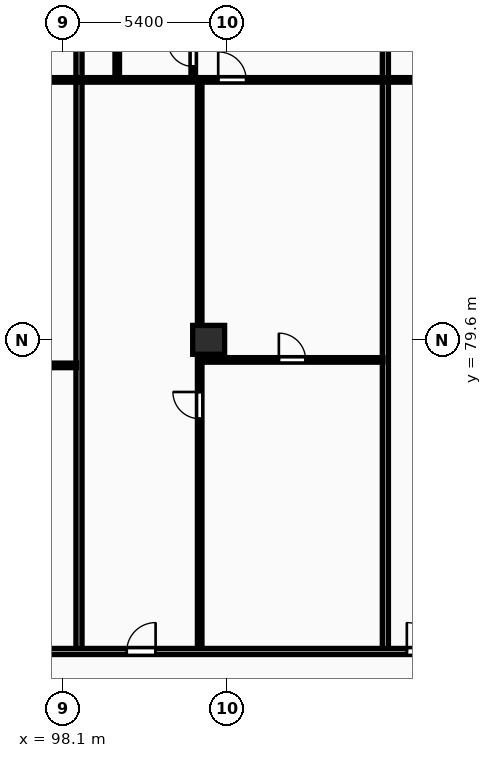
"""IFC4 building model, lengths in metres.
Left out: names, types, materials, properties, quantities, classifications, styles, units other than length and angle.
Written with IfcOpenShell. Run it as: python <this file> out.ifc"""

import sys

from ifc_helpers import new_model, si_unit, direction, frame, frame_2d, origin, origin_2d, place, context, subcontext, project, spatial, rectangle, extrude, element, fill, save


model = new_model("IFC4")
c1 = context("Model", 3, precision=1e-05, world=origin(), true_north=direction((0.0, 1.0)))
c2 = subcontext(c1, "Body", "Model", "MODEL_VIEW")
j1 = project(units=[si_unit("LENGTHUNIT", "METRE"), si_unit("PLANEANGLEUNIT", "RADIAN")], contexts=[c1])
p1 = place(None, origin())
s1 = spatial("IfcSite", under=j1, at=p1, CompositionType="ELEMENT")
p2 = place(p1, origin())
s2 = spatial("IfcBuilding", under=s1, at=p2, CompositionType="ELEMENT")
p3 = place(p2, frame((0.0, 0.0, 24.0)))
s3 = spatial("IfcBuildingStorey", under=s2, at=p3, CompositionType="ELEMENT", Elevation=24.0)
p4 = place(p3, frame((102.9, 79.6, 0.0), z_axis=(0.0, 0.0, 1.0), x_axis=(1.0, 0.0, 0.0)))
e1 = element("IfcColumn", 1, at=p4, inside=s3, PredefinedType="COLUMN", context=c2, shape_type="SweptSolid", body=[
    extrude(rectangle(XDim=1.05, YDim=0.95, at=origin_2d()), origin(), (0.0, 0.0, 1.0), 3.25),
])
p5 = place(p3, frame((98.635, 69.43, 0.0), z_axis=(0.0, 0.0, 1.0), x_axis=(0.0, 1.0, 0.0)))
e2 = element("IfcWall", 2, at=p5, inside=s3, PredefinedType="PARTITIONING", context=c2, shape_type="SweptSolid", body=[
    extrude(rectangle(XDim=29.07, YDim=0.2, at=frame_2d((14.535, 0.0))), origin(), (0.0, 0.0, 1.0), 2.97),
])
p6 = place(p3, frame((90.572, 78.76, 0.0), z_axis=(0.0, 0.0, 1.0), x_axis=(1.0, 0.0, 0.0)))
e3 = element("IfcWall", 3, at=p6, inside=s3, PredefinedType="PARTITIONING", context=c2, shape_type="SweptSolid", body=[
    extrude(rectangle(XDim=7.983, YDim=0.15, at=frame_2d((3.992, 0.0))), origin(), (0.0, 0.0, 1.0), 2.97),
])
p7 = place(p6, frame((0.495, 0.0, 0.0)))
e4 = element("IfcOpeningElement", 4, at=p7, cuts=e3, PredefinedType="OPENING", context=c2, shape_type="SweptSolid", body=[
    extrude(rectangle(XDim=0.88, YDim=2.06, at=frame_2d((0.44, 1.03))), frame((0.0, 0.085, 0.0), z_axis=(0.0, -1.0, 0.0), x_axis=(1.0, 0.0, 0.0)), (0.0, 0.0, 1.0), 0.17),
])
p8 = place(p3, frame((86.622, 88.15, 0.0), z_axis=(0.0, 0.0, 1.0), x_axis=(1.0, 0.0, 0.0)))
e5 = element("IfcWall", 5, at=p8, inside=s3, PredefinedType="PARTITIONING", context=c2, shape_type="SweptSolid", body=[
    extrude(rectangle(XDim=11.933, YDim=0.15, at=frame_2d((5.967, 0.0))), origin(), (0.0, 0.0, 1.0), 2.97),
])
p9 = place(p8, frame((5.914, 0.0, 0.0)))
e6 = element("IfcOpeningElement", 6, at=p9, cuts=e5, PredefinedType="OPENING", context=c2, shape_type="SweptSolid", body=[
    extrude(rectangle(XDim=0.92, YDim=2.08, at=frame_2d((0.46, 1.04))), frame((0.0, 0.085, 0.0), z_axis=(0.0, -1.0, 0.0), x_axis=(1.0, 0.0, 0.0)), (0.0, 0.0, 1.0), 0.17),
])
p10 = place(p3, frame((108.713, 69.43, 0.0), z_axis=(0.0, 0.0, 1.0), x_axis=(0.0, 1.0, 0.0)))
e7 = element("IfcWall", 7, at=p10, inside=s3, PredefinedType="PARTITIONING", context=c2, shape_type="SweptSolid", body=[
    extrude(rectangle(XDim=29.07, YDim=0.2, at=frame_2d((14.535, 0.0))), origin(), (0.0, 0.0, 1.0), 2.97),
])
p11 = place(p3, frame((102.665, 78.94, 0.0), z_axis=(0.0, 0.0, 1.0), x_axis=(1.0, 0.0, 0.0)))
e8 = element("IfcWall", 8, at=p11, inside=s3, PredefinedType="PARTITIONING", context=c2, shape_type="SweptSolid", body=[
    extrude(rectangle(XDim=5.968, YDim=0.15, at=frame_2d((2.984, 0.0))), origin(), (0.0, 0.0, 1.0), 2.97),
])
p12 = place(p11, frame((2.544, 0.0, 0.0)))
e9 = element("IfcOpeningElement", 9, at=p12, cuts=e8, PredefinedType="OPENING", context=c2, shape_type="SweptSolid", body=[
    extrude(rectangle(XDim=0.88, YDim=2.06, at=frame_2d((0.44, 1.03))), frame((0.0, 0.085, 0.0), z_axis=(0.0, -1.0, 0.0), x_axis=(1.0, 0.0, 0.0)), (0.0, 0.0, 1.0), 0.17),
])
p13 = place(p3, frame((102.605, 69.41, 0.0), z_axis=(0.0, 0.0, 1.0), x_axis=(0.0, 1.0, 0.0)))
e10 = element("IfcWall", 10, at=p13, inside=s3, PredefinedType="PARTITIONING", context=c2, shape_type="SweptSolid", body=[
    extrude(rectangle(XDim=18.7, YDim=0.15, at=frame_2d((9.35, 0.0))), origin(), (0.0, 0.0, 1.0), 2.22),
])
p14 = place(p13, frame((7.595, 0.0, 0.0)))
e11 = element("IfcOpeningElement", 11, at=p14, cuts=e10, PredefinedType="OPENING", context=c2, shape_type="SweptSolid", body=[
    extrude(rectangle(XDim=0.88, YDim=2.06, at=frame_2d((0.44, 1.03))), frame((0.0, 0.085, 0.0), z_axis=(0.0, -1.0, 0.0), x_axis=(1.0, 0.0, 0.0)), (0.0, 0.0, 1.0), 0.17),
])
p15 = place(p3, frame((99.893, 88.19, 0.0), z_axis=(0.0, 0.0, 1.0), x_axis=(0.0, 1.0, 0.0)))
e12 = element("IfcWall", 12, at=p15, inside=s3, PredefinedType="PARTITIONING", context=c2, shape_type="SweptSolid", body=[
    extrude(rectangle(XDim=5.0, YDim=0.15, at=frame_2d((2.5, 0.0))), origin(), (0.0, 0.0, 1.0), 2.97),
])
p16 = place(p15, frame((2.08, 0.0, 0.0)))
e13 = element("IfcOpeningElement", 13, at=p16, cuts=e12, PredefinedType="OPENING", context=c2, shape_type="SweptSolid", body=[
    extrude(rectangle(XDim=0.84, YDim=2.04, at=frame_2d((0.42, 1.02))), frame((0.0, 0.085, 0.0), z_axis=(0.0, -1.0, 0.0), x_axis=(1.0, 0.0, 0.0)), (0.0, 0.0, 1.0), 0.17),
])
p17 = place(p3, frame((102.393, 88.19, 0.0), z_axis=(0.0, 0.0, 1.0), x_axis=(0.0, 1.0, 0.0)))
e14 = element("IfcWall", 14, at=p17, inside=s3, PredefinedType="PARTITIONING", context=c2, shape_type="SweptSolid", body=[
    extrude(rectangle(XDim=5.0, YDim=0.15, at=frame_2d((2.5, 0.0))), origin(), (0.0, 0.0, 1.0), 2.97),
])
p18 = place(p17, frame((0.4, 0.0, 0.0)))
e15 = element("IfcOpeningElement", 15, at=p18, cuts=e14, PredefinedType="OPENING", context=c2, shape_type="SweptSolid", body=[
    extrude(rectangle(XDim=0.84, YDim=2.04, at=frame_2d((0.42, 1.02))), frame((0.0, 0.085, 0.0), z_axis=(0.0, -1.0, 0.0), x_axis=(1.0, 0.0, 0.0)), (0.0, 0.0, 1.0), 0.17),
])
p19 = place(p3, frame((98.715, 88.15, 0.0), z_axis=(0.0, 0.0, 1.0), x_axis=(1.0, 0.0, 0.0)))
e16 = element("IfcWall", 16, at=p19, inside=s3, PredefinedType="PARTITIONING", context=c2, shape_type="SweptSolid", body=[
    extrude(rectangle(XDim=9.918, YDim=0.15, at=frame_2d((4.959, 0.0))), origin(), (0.0, 0.0, 1.0), 2.97),
])
p20 = place(p19, frame((4.499, 0.0, 0.0)))
e17 = element("IfcOpeningElement", 17, at=p20, cuts=e16, PredefinedType="OPENING", context=c2, shape_type="SweptSolid", body=[
    extrude(rectangle(XDim=0.92, YDim=2.08, at=frame_2d((0.46, 1.04))), frame((0.0, 0.085, 0.0), z_axis=(0.0, -1.0, 0.0), x_axis=(1.0, 0.0, 0.0)), (0.0, 0.0, 1.0), 0.17),
])
p21 = place(p3, frame((108.793, 88.15, 0.0), z_axis=(0.0, 0.0, 1.0), x_axis=(1.0, 0.0, 0.0)))
e18 = element("IfcWall", 18, at=p21, inside=s3, PredefinedType="PARTITIONING", context=c2, shape_type="SweptSolid", body=[
    extrude(rectangle(XDim=10.926, YDim=0.15, at=frame_2d((5.463, 0.0))), origin(), (0.0, 0.0, 1.0), 2.97),
])
p22 = place(p21, frame((5.003, 0.0, 0.0)))
e19 = element("IfcOpeningElement", 19, at=p22, cuts=e18, PredefinedType="OPENING", context=c2, shape_type="SweptSolid", body=[
    extrude(rectangle(XDim=0.92, YDim=2.08, at=frame_2d((0.46, 1.04))), frame((0.0, 0.085, 0.0), z_axis=(0.0, -1.0, 0.0), x_axis=(1.0, 0.0, 0.0)), (0.0, 0.0, 1.0), 0.17),
])
p23 = place(p3, frame((55.3, 69.35, 0.0), z_axis=(0.0, 0.0, 1.0), x_axis=(1.0, 0.0, 0.0)))
e20 = element("IfcWall", 20, at=p23, inside=s3, PredefinedType="PARTITIONING", context=c2, shape_type="SweptSolid", body=[
    extrude(rectangle(XDim=77.6, YDim=0.2, at=frame_2d((38.8, 0.0))), origin(), (0.0, 0.0, 1.0), 2.97),
])
p24 = place(p23, frame((1.81, 0.0, 0.0)))
e21 = element("IfcOpeningElement", 21, at=p24, cuts=e20, PredefinedType="OPENING", context=c2, shape_type="SweptSolid", body=[
    extrude(rectangle(XDim=0.95, YDim=2.15, at=frame_2d((0.475, 1.075))), frame((0.0, 0.11, 0.0), z_axis=(0.0, -1.0, 0.0), x_axis=(1.0, 0.0, 0.0)), (0.0, 0.0, 1.0), 0.22),
])
p25 = place(p23, frame((10.448, 0.0, 0.0)))
e22 = element("IfcOpeningElement", 22, at=p25, cuts=e20, PredefinedType="OPENING", context=c2, shape_type="SweptSolid", body=[
    extrude(rectangle(XDim=0.95, YDim=2.15, at=frame_2d((0.475, 1.075))), frame((0.0, 0.11, 0.0), z_axis=(0.0, -1.0, 0.0), x_axis=(1.0, 0.0, 0.0)), (0.0, 0.0, 1.0), 0.22),
])
p26 = place(p23, frame((23.208, 0.0, 0.0)))
e23 = element("IfcOpeningElement", 23, at=p26, cuts=e20, PredefinedType="OPENING", context=c2, shape_type="SweptSolid", body=[
    extrude(rectangle(XDim=0.95, YDim=2.15, at=frame_2d((0.475, 1.075))), frame((0.0, 0.11, 0.0), z_axis=(0.0, -1.0, 0.0), x_axis=(1.0, 0.0, 0.0)), (0.0, 0.0, 1.0), 0.22),
])
p27 = place(p23, frame((33.287, 0.0, 0.0)))
e24 = element("IfcOpeningElement", 24, at=p27, cuts=e20, PredefinedType="OPENING", context=c2, shape_type="SweptSolid", body=[
    extrude(rectangle(XDim=0.95, YDim=2.15, at=frame_2d((0.475, 1.075))), frame((0.0, 0.11, 0.0), z_axis=(0.0, -1.0, 0.0), x_axis=(1.0, 0.0, 0.0)), (0.0, 0.0, 1.0), 0.22),
])
p28 = place(p23, frame((44.905, 0.0, 0.0)))
e25 = element("IfcOpeningElement", 25, at=p28, cuts=e20, PredefinedType="OPENING", context=c2, shape_type="SweptSolid", body=[
    extrude(rectangle(XDim=0.95, YDim=2.15, at=frame_2d((0.475, 1.075))), frame((0.0, 0.11, 0.0), z_axis=(0.0, -1.0, 0.0), x_axis=(1.0, 0.0, 0.0)), (0.0, 0.0, 1.0), 0.22),
])
p29 = place(p23, frame((54.119, 0.0, 0.0)))
e26 = element("IfcOpeningElement", 26, at=p29, cuts=e20, PredefinedType="OPENING", context=c2, shape_type="SweptSolid", body=[
    extrude(rectangle(XDim=0.95, YDim=2.15, at=frame_2d((0.475, 1.075))), frame((0.0, 0.11, 0.0), z_axis=(0.0, -1.0, 0.0), x_axis=(1.0, 0.0, 0.0)), (0.0, 0.0, 1.0), 0.22),
])
p30 = place(p23, frame((66.74, 0.0, 0.0)))
e27 = element("IfcOpeningElement", 27, at=p30, cuts=e20, PredefinedType="OPENING", context=c2, shape_type="SweptSolid", body=[
    extrude(rectangle(XDim=0.95, YDim=2.15, at=frame_2d((0.475, 1.075))), frame((0.0, 0.11, 0.0), z_axis=(0.0, -1.0, 0.0), x_axis=(1.0, 0.0, 0.0)), (0.0, 0.0, 1.0), 0.22),
])
p31 = place(p12, origin())
e28 = element("IfcDoor", 28, at=p31, inside=s3, OperationType="SINGLE_SWING_LEFT", PredefinedType="DOOR", context=c2, shape_type="SweptSolid", body=[
    extrude(rectangle(XDim=0.88, YDim=2.06, at=frame_2d((0.44, 1.03))), frame((0.0, 0.025, 0.0), z_axis=(0.0, -1.0, 0.0), x_axis=(1.0, 0.0, 0.0)), (0.0, 0.0, 1.0), 0.05),
])
fill(e9, e28)
p32 = place(p14, origin())
e29 = element("IfcDoor", 29, at=p32, inside=s3, OperationType="SINGLE_SWING_RIGHT", PredefinedType="DOOR", context=c2, shape_type="SweptSolid", body=[
    extrude(rectangle(XDim=0.88, YDim=2.06, at=frame_2d((0.44, 1.03))), frame((0.0, 0.025, 0.0), z_axis=(0.0, -1.0, 0.0), x_axis=(1.0, 0.0, 0.0)), (0.0, 0.0, 1.0), 0.05),
])
fill(e11, e29)
p33 = place(p18, origin())
e30 = element("IfcDoor", 30, at=p33, inside=s3, OperationType="SINGLE_SWING_RIGHT", PredefinedType="DOOR", context=c2, shape_type="SweptSolid", body=[
    extrude(rectangle(XDim=0.84, YDim=2.04, at=frame_2d((0.42, 1.02))), frame((0.0, 0.025, 0.0), z_axis=(0.0, -1.0, 0.0), x_axis=(1.0, 0.0, 0.0)), (0.0, 0.0, 1.0), 0.05),
])
fill(e15, e30)
p34 = place(p20, origin())
e31 = element("IfcDoor", 31, at=p34, inside=s3, OperationType="SINGLE_SWING_LEFT", PredefinedType="DOOR", context=c2, shape_type="SweptSolid", body=[
    extrude(rectangle(XDim=0.92, YDim=2.08, at=frame_2d((0.46, 1.04))), frame((0.0, 0.025, 0.0), z_axis=(0.0, -1.0, 0.0), x_axis=(1.0, 0.0, 0.0)), (0.0, 0.0, 1.0), 0.05),
])
fill(e17, e31)
p35 = place(p28, origin())
e32 = element("IfcDoor", 32, at=p35, inside=s3, OperationType="SINGLE_SWING_RIGHT", PredefinedType="DOOR", context=c2, shape_type="SweptSolid", body=[
    extrude(rectangle(XDim=0.95, YDim=2.15, at=frame_2d((0.475, 1.075))), frame((0.0, 0.025, 0.0), z_axis=(0.0, -1.0, 0.0), x_axis=(1.0, 0.0, 0.0)), (0.0, 0.0, 1.0), 0.05),
])
fill(e25, e32)
p36 = place(p29, origin())
e33 = element("IfcDoor", 33, at=p36, inside=s3, OperationType="SINGLE_SWING_LEFT", PredefinedType="DOOR", context=c2, shape_type="SweptSolid", body=[
    extrude(rectangle(XDim=0.95, YDim=2.15, at=frame_2d((0.475, 1.075))), frame((0.0, 0.025, 0.0), z_axis=(0.0, -1.0, 0.0), x_axis=(1.0, 0.0, 0.0)), (0.0, 0.0, 1.0), 0.05),
])
fill(e26, e33)
save(model, sys.argv[1])
